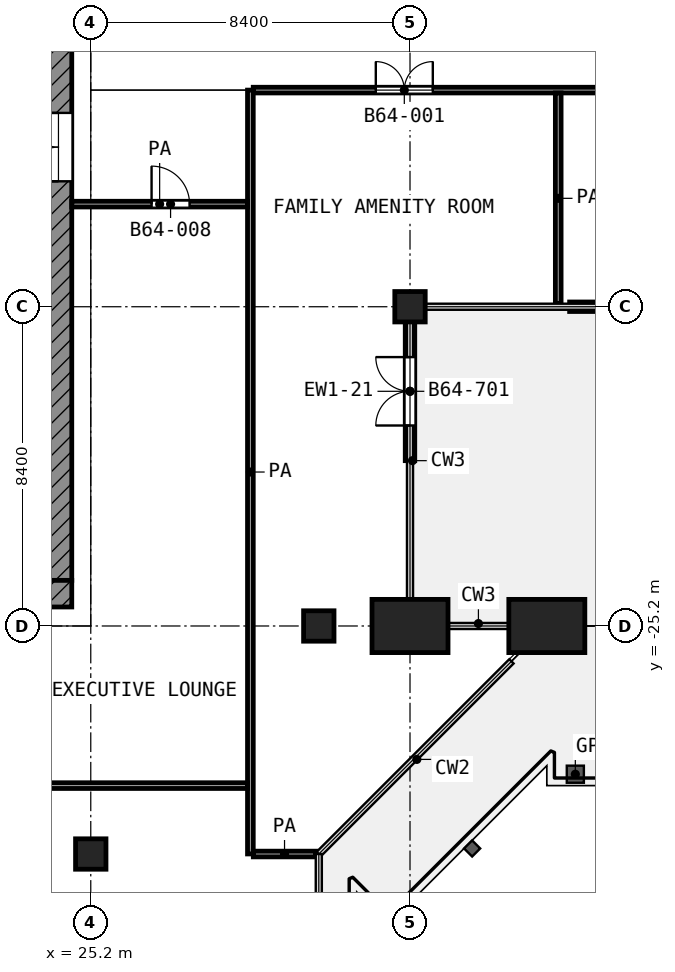
"""IFC4 building model, lengths in metres.
Left out: names, types, materials, properties, quantities, classifications, styles, units other than length and angle.
Written with IfcOpenShell. Run it as: python <this file> out.ifc"""

import sys

from ifc_helpers import new_model, si_unit, direction, frame, frame_2d, origin, origin_2d, place, context, subcontext, project, spatial, rectangle, extrude, element, fill, save


model = new_model("IFC4")
c1 = context("Model", 3, precision=1e-05, world=origin(), true_north=direction((0.0, 1.0)))
c2 = subcontext(c1, "Body", "Model", "MODEL_VIEW")
j1 = project(units=[si_unit("LENGTHUNIT", "METRE"), si_unit("PLANEANGLEUNIT", "RADIAN")], contexts=[c1])
p1 = place(None, origin())
s1 = spatial("IfcSite", under=j1, at=p1, CompositionType="ELEMENT")
p2 = place(p1, origin())
s2 = spatial("IfcBuilding", under=s1, at=p2, CompositionType="ELEMENT")
p3 = place(p2, frame((0.0, 0.0, 277.6)))
s3 = spatial("IfcBuildingStorey", under=s2, at=p3, CompositionType="ELEMENT", Elevation=277.6)
for number, where, z_axis, x_axis in (
    (1, (33.6, -16.8, 0.0), (0.0, 0.0, 1.0), (1.0, 0.0, 0.0)),
    (2, (31.2, -25.2, 0.0), (0.0, 0.0, 1.0), (1.0, 0.0, 0.0)),
    (3, (25.2, -31.2, 0.0), (0.0, 0.0, 1.0), (1.0, 0.0, 0.0)),
):
    element("IfcColumn", number, at=place(p3, frame(where, z_axis=z_axis, x_axis=x_axis)), inside=s3, PredefinedType="COLUMN", context=c2, shape_type="SweptSolid", body=[
        extrude(rectangle(XDim=0.8, YDim=0.8, at=origin_2d()), origin(), (0.0, 0.0, 1.0), 4.2),
    ])
for number, where, z_axis, x_axis in (
    (4, (37.2, -25.2, 0.0), (0.0, 0.0, 1.0), (-1.0, 0.0, 0.0)),
    (5, (33.6, -25.2, 0.0), (0.0, 0.0, 1.0), (-1.0, 0.0, 0.0)),
):
    element("IfcColumn", number, at=place(p3, frame(where, z_axis=z_axis, x_axis=x_axis)), inside=s3, PredefinedType="COLUMN", context=c2, shape_type="SweptSolid", body=[
        extrude(rectangle(XDim=2.0, YDim=1.4, at=origin_2d()), origin(), (0.0, 0.0, 1.0), 4.2),
    ])
p4 = place(p3, frame((33.6, -20.85, 0.0), z_axis=(0.0, 0.0, 1.0), x_axis=(0.0, 1.0, 0.0)))
e6 = element("IfcWall", 6, at=p4, inside=s3, PredefinedType="SOLIDWALL", context=c2, shape_type="SweptSolid", body=[
    extrude(rectangle(XDim=3.65, YDim=0.25, at=frame_2d((1.825, 0.0))), origin(), (0.0, 0.0, 1.0), 3.46),
])
p5 = place(p4, frame((0.925, 0.0, 0.0)))
e7 = element("IfcOpeningElement", 7, at=p5, cuts=e6, PredefinedType="OPENING", context=c2, shape_type="SweptSolid", body=[
    extrude(rectangle(XDim=1.8, YDim=2.1, at=frame_2d((0.9, 1.05))), frame((0.0, 0.135, 0.0), z_axis=(0.0, -1.0, 0.0), x_axis=(1.0, 0.0, 0.0)), (0.0, 0.0, 1.0), 0.27),
])
p6 = place(p3, frame((37.8, -16.8, 0.0), z_axis=(0.0, 0.0, 1.0), x_axis=(1.0, 0.0, 0.0)))
e8 = element("IfcWall", 8, at=p6, inside=s3, PredefinedType="SOLIDWALL", context=c2, shape_type="SweptSolid", body=[
    extrude(rectangle(XDim=3.8, YDim=0.25, at=frame_2d((1.9, 0.0))), origin(), (0.0, 0.0, 1.0), 3.46),
])
p7 = place(p6, frame((1.0, 0.0, 0.0)))
e9 = element("IfcOpeningElement", 9, at=p7, cuts=e8, PredefinedType="OPENING", context=c2, shape_type="SweptSolid", body=[
    extrude(rectangle(XDim=1.8, YDim=2.1, at=frame_2d((0.9, 1.05))), frame((0.0, 0.135, 0.0), z_axis=(0.0, -1.0, 0.0), x_axis=(1.0, 0.0, 0.0)), (0.0, 0.0, 1.0), 0.27),
])
p8 = place(p3, frame((24.35, -24.0, 0.0), z_axis=(0.0, 0.0, 1.0), x_axis=(0.0, 1.0, 0.0)))
e10 = element("IfcWall", 10, at=p8, inside=s3, PredefinedType="SHEAR", context=c2, shape_type="SweptSolid", body=[
    extrude(rectangle(XDim=18.6, YDim=0.7, at=frame_2d((9.3, 0.0))), origin(), (0.0, 0.0, 1.0), 3.6),
])
p9 = place(p8, frame((10.5, 0.0, 0.0)))
e11 = element("IfcOpeningElement", 11, at=p9, cuts=e10, PredefinedType="OPENING", context=c2, shape_type="SweptSolid", body=[
    extrude(rectangle(XDim=1.8, YDim=2.1, at=frame_2d((0.9, 1.05))), frame((0.0, 0.36, 0.0), z_axis=(0.0, -1.0, 0.0), x_axis=(1.0, 0.0, 0.0)), (0.0, 0.0, 1.0), 0.72),
])
p10 = place(p3, frame((24.35, -24.7, 0.0), z_axis=(0.0, 0.0, 1.0), x_axis=(0.0, 1.0, 0.0)))
e12 = element("IfcWall", 12, at=p10, inside=s3, PredefinedType="SHEAR", context=c2, shape_type="SweptSolid", body=[
    extrude(rectangle(XDim=0.7, YDim=0.7, at=frame_2d((0.35, 0.0))), origin(), (0.0, 0.0, 1.0), 3.6),
])
p11 = place(p3, frame((29.477, -31.2, 0.0), z_axis=(0.0, 0.0, 1.0), x_axis=(1.0, 0.0, 0.0)))
e13 = element("IfcWall", 13, at=p11, inside=s3, PredefinedType="PARTITIONING", context=c2, shape_type="SweptSolid", body=[
    extrude(rectangle(XDim=1.643, YDim=0.15, at=frame_2d((0.822, 0.0))), origin(), (0.0, 0.0, 1.0), 3.6),
])
p12 = place(p3, frame((11.175, -29.4, 0.0), z_axis=(0.0, 0.0, 1.0), x_axis=(1.0, 0.0, 0.0)))
e14 = element("IfcWall", 14, at=p12, inside=s3, PredefinedType="PARTITIONING", context=c2, shape_type="SweptSolid", body=[
    extrude(rectangle(XDim=18.15, YDim=0.15, at=frame_2d((9.075, 0.0))), origin(), (0.0, 0.0, 1.0), 3.6),
])
p13 = place(p3, frame((24.7, -14.1, 0.0), z_axis=(0.0, 0.0, 1.0), x_axis=(1.0, 0.0, 0.0)))
e15 = element("IfcWall", 15, at=p13, inside=s3, PredefinedType="PARTITIONING", context=c2, shape_type="SweptSolid", body=[
    extrude(rectangle(XDim=4.625, YDim=0.15, at=frame_2d((2.312, 0.0))), origin(), (0.0, 0.0, 1.0), 3.6),
])
p14 = place(p13, frame((2.1, 0.0, 0.0)))
e16 = element("IfcOpeningElement", 16, at=p14, cuts=e15, PredefinedType="OPENING", context=c2, shape_type="SweptSolid", body=[
    extrude(rectangle(XDim=1.0, YDim=2.1, at=frame_2d((0.5, 1.05))), frame((0.0, 0.085, 0.0), z_axis=(0.0, -1.0, 0.0), x_axis=(1.0, 0.0, 0.0)), (0.0, 0.0, 1.0), 0.17),
])
p15 = place(p3, frame((29.475, -11.1, 0.0), z_axis=(0.0, 0.0, 1.0), x_axis=(1.0, 0.0, 0.0)))
e17 = element("IfcWall", 17, at=p15, inside=s3, PredefinedType="PARTITIONING", context=c2, shape_type="SweptSolid", body=[
    extrude(rectangle(XDim=29.245, YDim=0.15, at=frame_2d((14.623, 0.0))), origin(), (0.0, 0.0, 1.0), 3.6),
])
p16 = place(p15, frame((3.225, 0.0, 0.0)))
e18 = element("IfcOpeningElement", 18, at=p16, cuts=e17, PredefinedType="OPENING", context=c2, shape_type="SweptSolid", body=[
    extrude(rectangle(XDim=1.5, YDim=2.1, at=frame_2d((0.75, 1.05))), frame((0.0, 0.085, 0.0), z_axis=(0.0, -1.0, 0.0), x_axis=(1.0, 0.0, 0.0)), (0.0, 0.0, 1.0), 0.17),
])
p17 = place(p15, frame((9.775, 0.0, 0.0)))
e19 = element("IfcOpeningElement", 19, at=p17, cuts=e17, PredefinedType="OPENING", context=c2, shape_type="SweptSolid", body=[
    extrude(rectangle(XDim=1.0, YDim=2.1, at=frame_2d((0.5, 1.05))), frame((0.0, 0.085, 0.0), z_axis=(0.0, -1.0, 0.0), x_axis=(1.0, 0.0, 0.0)), (0.0, 0.0, 1.0), 0.17),
])
p18 = place(p15, frame((14.275, 0.0, 0.0)))
e20 = element("IfcOpeningElement", 20, at=p18, cuts=e17, PredefinedType="OPENING", context=c2, shape_type="SweptSolid", body=[
    extrude(rectangle(XDim=1.0, YDim=2.1, at=frame_2d((0.5, 1.05))), frame((0.0, 0.085, 0.0), z_axis=(0.0, -1.0, 0.0), x_axis=(1.0, 0.0, 0.0)), (0.0, 0.0, 1.0), 0.17),
])
p19 = place(p15, frame((18.475, 0.0, 0.0)))
e21 = element("IfcOpeningElement", 21, at=p19, cuts=e17, PredefinedType="OPENING", context=c2, shape_type="SweptSolid", body=[
    extrude(rectangle(XDim=1.0, YDim=2.1, at=frame_2d((0.5, 1.05))), frame((0.0, 0.085, 0.0), z_axis=(0.0, -1.0, 0.0), x_axis=(1.0, 0.0, 0.0)), (0.0, 0.0, 1.0), 0.17),
])
p20 = place(p15, frame((24.375, 0.0, 0.0)))
e22 = element("IfcOpeningElement", 22, at=p20, cuts=e17, PredefinedType="OPENING", context=c2, shape_type="SweptSolid", body=[
    extrude(rectangle(XDim=1.5, YDim=2.1, at=frame_2d((0.75, 1.05))), frame((0.0, 0.085, 0.0), z_axis=(0.0, -1.0, 0.0), x_axis=(1.0, 0.0, 0.0)), (0.0, 0.0, 1.0), 0.17),
])
p21 = place(p3, frame((29.4, -31.198, 0.0), z_axis=(0.0, 0.0, 1.0), x_axis=(0.0, 1.0, 0.0)))
e23 = element("IfcWall", 23, at=p21, inside=s3, PredefinedType="PARTITIONING", context=c2, shape_type="SweptSolid", body=[
    extrude(rectangle(XDim=20.098, YDim=0.15, at=frame_2d((10.049, 0.0))), origin(), (0.0, 0.0, 1.0), 3.6),
])
p22 = place(p3, frame((37.5, -16.72, 0.0), z_axis=(0.0, 0.0, 1.0), x_axis=(0.0, 1.0, 0.0)))
e24 = element("IfcWall", 24, at=p22, inside=s3, PredefinedType="PARTITIONING", context=c2, shape_type="SweptSolid", body=[
    extrude(rectangle(XDim=5.545, YDim=0.15, at=frame_2d((2.772, 0.0))), origin(), (0.0, 0.0, 1.0), 3.6),
])
p23 = place(p5, origin())
e25 = element("IfcDoor", 25, at=p23, inside=s3, OperationType="DOUBLE_DOOR_SINGLE_SWING", PredefinedType="DOOR", context=c2, shape_type="SweptSolid", body=[
    extrude(rectangle(XDim=1.8, YDim=2.1, at=frame_2d((0.9, 1.05))), frame((0.0, 0.025, 0.0), z_axis=(0.0, -1.0, 0.0), x_axis=(1.0, 0.0, 0.0)), (0.0, 0.0, 1.0), 0.05),
])
fill(e7, e25)
p24 = place(p9, origin())
e26 = element("IfcDoor", 26, at=p24, inside=s3, OperationType="DOUBLE_DOOR_SINGLE_SWING", PredefinedType="DOOR", context=c2, shape_type="SweptSolid", body=[
    extrude(rectangle(XDim=1.8, YDim=2.1, at=frame_2d((0.9, 1.05))), frame((0.0, 0.025, 0.0), z_axis=(0.0, -1.0, 0.0), x_axis=(1.0, 0.0, 0.0)), (0.0, 0.0, 1.0), 0.05),
])
fill(e11, e26)
p25 = place(p14, origin())
e27 = element("IfcDoor", 27, at=p25, inside=s3, OperationType="SINGLE_SWING_LEFT", PredefinedType="DOOR", context=c2, shape_type="SweptSolid", body=[
    extrude(rectangle(XDim=1.0, YDim=2.1, at=frame_2d((0.5, 1.05))), frame((0.0, 0.025, 0.0), z_axis=(0.0, -1.0, 0.0), x_axis=(1.0, 0.0, 0.0)), (0.0, 0.0, 1.0), 0.05),
])
fill(e16, e27)
p26 = place(p16, origin())
e28 = element("IfcDoor", 28, at=p26, inside=s3, OperationType="DOUBLE_DOOR_SINGLE_SWING", PredefinedType="DOOR", context=c2, shape_type="SweptSolid", body=[
    extrude(rectangle(XDim=1.5, YDim=2.1, at=frame_2d((0.75, 1.05))), frame((0.0, 0.025, 0.0), z_axis=(0.0, -1.0, 0.0), x_axis=(1.0, 0.0, 0.0)), (0.0, 0.0, 1.0), 0.05),
])
fill(e18, e28)
save(model, sys.argv[1])
